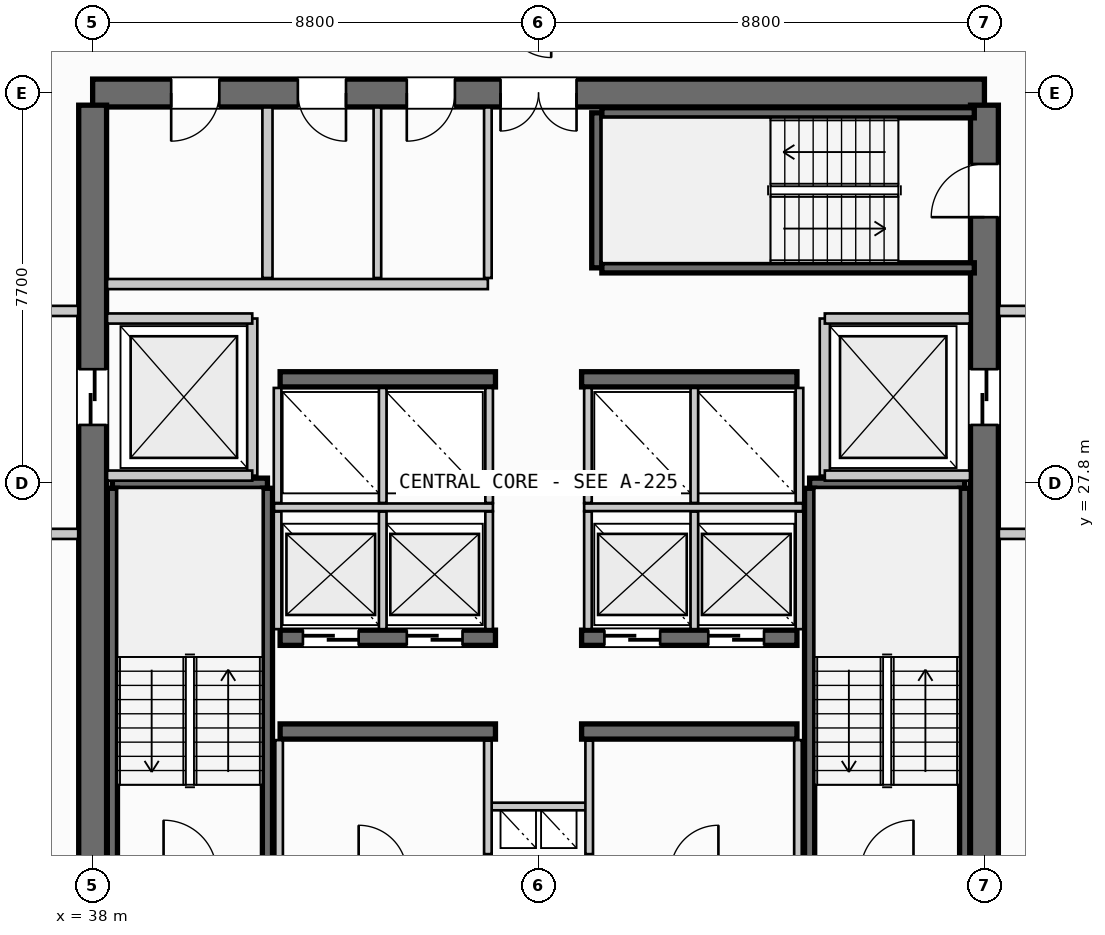
"""IFC4 building model, lengths in metres.
Left out: names, types, materials, properties, quantities, classifications, styles, units other than length and angle.
Written with IfcOpenShell. Run it as: python <this file> out.ifc"""

import sys

from ifc_helpers import new_model, si_unit, direction, frame, frame_2d, origin, place, context, subcontext, project, spatial, rectangle, extrude, source, transform, mapped, element, fill, save


model = new_model("IFC4")
c1 = context("Model", 3, precision=1e-05, world=origin(), true_north=direction((0.0, 1.0)))
c2 = subcontext(c1, "Body", "Model", "MODEL_VIEW")
j1 = project(units=[si_unit("LENGTHUNIT", "METRE"), si_unit("PLANEANGLEUNIT", "RADIAN")], contexts=[c1])
p1 = place(None, origin())
s1 = spatial("IfcSite", under=j1, at=p1, CompositionType="ELEMENT")
p2 = place(p1, origin())
s2 = spatial("IfcBuilding", under=s1, at=p2, CompositionType="ELEMENT")
p3 = place(p2, frame((0.0, 0.0, 183.4)))
s3 = spatial("IfcBuildingStorey", under=s2, at=p3, CompositionType="ELEMENT", Elevation=183.4)
p4 = place(p3, frame((55.6, 35.5, 0.0), z_axis=(0.0, 0.0, 1.0), x_axis=(-1.0, 0.0, 0.0)))
e1 = element("IfcWall", 1, at=p4, inside=s3, PredefinedType="SHEAR", context=c2, shape_type="SweptSolid", body=[
    extrude(rectangle(XDim=17.6, YDim=0.55, at=frame_2d((8.8, 0.0))), origin(), (0.0, 0.0, 1.0), 3.26),
])
p5 = place(p4, frame((8.05, 0.0, 0.0)))
e2 = element("IfcOpeningElement", 2, at=p5, cuts=e1, PredefinedType="OPENING", context=c2, shape_type="SweptSolid", body=[
    extrude(rectangle(XDim=1.5, YDim=2.2, at=frame_2d((0.75, 1.1))), frame((0.0, 0.285, 0.0), z_axis=(0.0, -1.0, 0.0), x_axis=(1.0, 0.0, 0.0)), (0.0, 0.0, 1.0), 0.57),
])
p6 = place(p4, frame((15.1, 0.0, 0.0)))
e3 = element("IfcOpeningElement", 3, at=p6, cuts=e1, PredefinedType="OPENING", context=c2, shape_type="SweptSolid", body=[
    extrude(rectangle(XDim=0.95, YDim=2.15, at=frame_2d((0.475, 1.075))), frame((0.0, 0.285, 0.0), z_axis=(0.0, -1.0, 0.0), x_axis=(1.0, 0.0, 0.0)), (0.0, 0.0, 1.0), 0.57),
])
p7 = place(p4, frame((12.6, 0.0, 0.0)))
e4 = element("IfcOpeningElement", 4, at=p7, cuts=e1, PredefinedType="OPENING", context=c2, shape_type="SweptSolid", body=[
    extrude(rectangle(XDim=0.95, YDim=2.15, at=frame_2d((0.475, 1.075))), frame((0.0, 0.285, 0.0), z_axis=(0.0, -1.0, 0.0), x_axis=(1.0, 0.0, 0.0)), (0.0, 0.0, 1.0), 0.57),
])
p8 = place(p4, frame((10.45, 0.0, 0.0)))
e5 = element("IfcOpeningElement", 5, at=p8, cuts=e1, PredefinedType="OPENING", context=c2, shape_type="SweptSolid", body=[
    extrude(rectangle(XDim=0.95, YDim=2.15, at=frame_2d((0.475, 1.075))), frame((0.0, 0.285, 0.0), z_axis=(0.0, -1.0, 0.0), x_axis=(1.0, 0.0, 0.0)), (0.0, 0.0, 1.0), 0.57),
])
p9 = place(p3, frame((38.0, 35.26, 0.0), z_axis=(0.0, 0.0, 1.0), x_axis=(0.0, -1.0, 0.0)))
e6 = element("IfcWall", 6, at=p9, inside=s3, PredefinedType="SHEAR", context=c2, shape_type="SweptSolid", body=[
    extrude(rectangle(XDim=14.92, YDim=0.55, at=frame_2d((7.46, 0.0))), origin(), (0.0, 0.0, 1.0), 3.26),
])
p10 = place(p9, frame((5.21, 0.0, 0.0)))
e7 = element("IfcOpeningElement", 7, at=p10, cuts=e6, PredefinedType="OPENING", context=c2, shape_type="SweptSolid", body=[
    extrude(rectangle(XDim=1.1, YDim=2.2, at=frame_2d((0.55, 1.1))), frame((0.0, 0.285, 0.0), z_axis=(0.0, -1.0, 0.0), x_axis=(1.0, 0.0, 0.0)), (0.0, 0.0, 1.0), 0.57),
])
p11 = place(p3, frame((55.6, 20.34, 0.0), z_axis=(0.0, 0.0, 1.0), x_axis=(0.0, 1.0, 0.0)))
e8 = element("IfcWall", 8, at=p11, inside=s3, PredefinedType="SHEAR", context=c2, shape_type="SweptSolid", body=[
    extrude(rectangle(XDim=14.92, YDim=0.55, at=frame_2d((7.46, 0.0))), origin(), (0.0, 0.0, 1.0), 3.26),
])
p12 = place(p11, frame((12.71, 0.0, 0.0)))
e9 = element("IfcOpeningElement", 9, at=p12, cuts=e8, PredefinedType="OPENING", context=c2, shape_type="SweptSolid", body=[
    extrude(rectangle(XDim=1.05, YDim=2.15, at=frame_2d((0.525, 1.075))), frame((0.0, 0.285, 0.0), z_axis=(0.0, -1.0, 0.0), x_axis=(1.0, 0.0, 0.0)), (0.0, 0.0, 1.0), 0.57),
])
p13 = place(p11, frame((8.61, 0.0, 0.0)))
e10 = element("IfcOpeningElement", 10, at=p13, cuts=e8, PredefinedType="OPENING", context=c2, shape_type="SweptSolid", body=[
    extrude(rectangle(XDim=1.1, YDim=2.2, at=frame_2d((0.55, 1.1))), frame((0.0, 0.285, 0.0), z_axis=(0.0, -1.0, 0.0), x_axis=(1.0, 0.0, 0.0)), (0.0, 0.0, 1.0), 0.57),
])
for number, where, z_axis, x_axis in (
    (11, (41.7, 22.9, 0.0), (0.0, 0.0, 1.0), (1.0, 0.0, 0.0)),
    (12, (47.65, 22.9, 0.0), (0.0, 0.0, 1.0), (1.0, 0.0, 0.0)),
):
    element("IfcWall", number, at=place(p3, frame(where, z_axis=z_axis, x_axis=x_axis)), inside=s3, PredefinedType="SHEAR", context=c2, shape_type="SweptSolid", body=[
        extrude(rectangle(XDim=4.25, YDim=0.3, at=frame_2d((2.125, 0.0))), origin(), (0.0, 0.0, 1.0), 3.26),
    ])
p14 = place(p3, frame((41.7, 24.75, 0.0), z_axis=(0.0, 0.0, 1.0), x_axis=(1.0, 0.0, 0.0)))
e13 = element("IfcWall", 13, at=p14, inside=s3, PredefinedType="SHEAR", context=c2, shape_type="SweptSolid", body=[
    extrude(rectangle(XDim=4.25, YDim=0.3, at=frame_2d((2.125, 0.0))), origin(), (0.0, 0.0, 1.0), 3.26),
])
p15 = place(p14, frame((0.45, 0.0, 0.0)))
e14 = element("IfcOpeningElement", 14, at=p15, cuts=e13, PredefinedType="OPENING", context=c2, shape_type="SweptSolid", body=[
    extrude(rectangle(XDim=1.1, YDim=2.2, at=frame_2d((0.55, 1.1))), frame((0.0, 0.16, 0.0), z_axis=(0.0, -1.0, 0.0), x_axis=(1.0, 0.0, 0.0)), (0.0, 0.0, 1.0), 0.32),
])
p16 = place(p14, frame((2.5, 0.0, 0.0)))
e15 = element("IfcOpeningElement", 15, at=p16, cuts=e13, PredefinedType="OPENING", context=c2, shape_type="SweptSolid", body=[
    extrude(rectangle(XDim=1.1, YDim=2.2, at=frame_2d((0.55, 1.1))), frame((0.0, 0.16, 0.0), z_axis=(0.0, -1.0, 0.0), x_axis=(1.0, 0.0, 0.0)), (0.0, 0.0, 1.0), 0.32),
])
p17 = place(p3, frame((47.65, 24.75, 0.0), z_axis=(0.0, 0.0, 1.0), x_axis=(1.0, 0.0, 0.0)))
e16 = element("IfcWall", 16, at=p17, inside=s3, PredefinedType="SHEAR", context=c2, shape_type="SweptSolid", body=[
    extrude(rectangle(XDim=4.25, YDim=0.3, at=frame_2d((2.125, 0.0))), origin(), (0.0, 0.0, 1.0), 3.26),
])
p18 = place(p17, frame((0.45, 0.0, 0.0)))
e17 = element("IfcOpeningElement", 17, at=p18, cuts=e16, PredefinedType="OPENING", context=c2, shape_type="SweptSolid", body=[
    extrude(rectangle(XDim=1.1, YDim=2.2, at=frame_2d((0.55, 1.1))), frame((0.0, 0.16, 0.0), z_axis=(0.0, -1.0, 0.0), x_axis=(1.0, 0.0, 0.0)), (0.0, 0.0, 1.0), 0.32),
])
p19 = place(p17, frame((2.5, 0.0, 0.0)))
e18 = element("IfcOpeningElement", 18, at=p19, cuts=e16, PredefinedType="OPENING", context=c2, shape_type="SweptSolid", body=[
    extrude(rectangle(XDim=1.1, YDim=2.2, at=frame_2d((0.55, 1.1))), frame((0.0, 0.16, 0.0), z_axis=(0.0, -1.0, 0.0), x_axis=(1.0, 0.0, 0.0)), (0.0, 0.0, 1.0), 0.32),
])
for number, where, z_axis, x_axis in (
    (19, (41.7, 29.85, 0.0), (0.0, 0.0, 1.0), (1.0, 0.0, 0.0)),
    (20, (47.65, 29.85, 0.0), (0.0, 0.0, 1.0), (1.0, 0.0, 0.0)),
):
    element("IfcWall", number, at=place(p3, frame(where, z_axis=z_axis, x_axis=x_axis)), inside=s3, PredefinedType="SHEAR", context=c2, shape_type="SweptSolid", body=[
        extrude(rectangle(XDim=4.25, YDim=0.3, at=frame_2d((2.125, 0.0))), origin(), (0.0, 0.0, 1.0), 3.26),
    ])
p20 = place(p3, frame((38.39, 27.8, 0.0), z_axis=(0.0, 0.0, 1.0), x_axis=(1.0, 0.0, 0.0)))
e21 = element("IfcWall", 21, at=p20, inside=s3, PredefinedType="SHEAR", context=c2, shape_type="SweptSolid", body=[
    extrude(rectangle(XDim=3.06, YDim=0.2, at=frame_2d((1.53, 0.0))), origin(), (0.0, 0.0, 1.0), 3.26),
])
for number, where, z_axis, x_axis in (
    (22, (41.45, 27.7, 0.0), (0.0, 0.0, 1.0), (0.0, -1.0, 0.0)),
    (23, (38.39, 20.35, 0.0), (0.0, 0.0, 1.0), (0.0, 1.0, 0.0)),
):
    element("IfcWall", number, at=place(p3, frame(where, z_axis=z_axis, x_axis=x_axis)), inside=s3, PredefinedType="SHEAR", context=c2, shape_type="SweptSolid", body=[
        extrude(rectangle(XDim=7.35, YDim=0.2, at=frame_2d((3.675, 0.0))), origin(), (0.0, 0.0, 1.0), 3.26),
    ])
p21 = place(p3, frame((52.15, 27.8, 0.0), z_axis=(0.0, 0.0, 1.0), x_axis=(1.0, 0.0, 0.0)))
e24 = element("IfcWall", 24, at=p21, inside=s3, PredefinedType="SHEAR", context=c2, shape_type="SweptSolid", body=[
    extrude(rectangle(XDim=3.06, YDim=0.2, at=frame_2d((1.53, 0.0))), origin(), (0.0, 0.0, 1.0), 3.26),
])
for number, where, z_axis, x_axis in (
    (25, (55.21, 27.7, 0.0), (0.0, 0.0, 1.0), (0.0, -1.0, 0.0)),
    (26, (52.15, 20.35, 0.0), (0.0, 0.0, 1.0), (0.0, 1.0, 0.0)),
):
    element("IfcWall", number, at=place(p3, frame(where, z_axis=z_axis, x_axis=x_axis)), inside=s3, PredefinedType="SHEAR", context=c2, shape_type="SweptSolid", body=[
        extrude(rectangle(XDim=7.35, YDim=0.2, at=frame_2d((3.675, 0.0))), origin(), (0.0, 0.0, 1.0), 3.26),
    ])
p22 = place(p3, frame((47.95, 32.05, 0.0), z_axis=(0.0, 0.0, 1.0), x_axis=(0.0, 1.0, 0.0)))
e27 = element("IfcWall", 27, at=p22, inside=s3, PredefinedType="SHEAR", context=c2, shape_type="SweptSolid", body=[
    extrude(rectangle(XDim=3.06, YDim=0.2, at=frame_2d((1.53, 0.0))), origin(), (0.0, 0.0, 1.0), 3.26),
])
for number, where, z_axis, x_axis in (
    (28, (48.05, 35.11, 0.0), (0.0, 0.0, 1.0), (1.0, 0.0, 0.0)),
    (29, (55.4, 32.05, 0.0), (0.0, 0.0, 1.0), (-1.0, 0.0, 0.0)),
):
    element("IfcWall", number, at=place(p3, frame(where, z_axis=z_axis, x_axis=x_axis)), inside=s3, PredefinedType="SHEAR", context=c2, shape_type="SweptSolid", body=[
        extrude(rectangle(XDim=7.35, YDim=0.2, at=frame_2d((3.675, 0.0))), origin(), (0.0, 0.0, 1.0), 3.26),
    ])
p23 = place(p3, frame((45.8, 21.42, 0.0), z_axis=(0.0, 0.0, 1.0), x_axis=(1.0, 0.0, 0.0)))
e30 = element("IfcWall", 30, at=p23, inside=s3, PredefinedType="PARTITIONING", context=c2, shape_type="SweptSolid", body=[
    extrude(rectangle(XDim=2.0, YDim=0.15, at=frame_2d((1.0, 0.0))), origin(), (0.0, 0.0, 1.0), 2.28),
])
for number, where, z_axis, x_axis in (
    (31, (45.8, 20.48, 0.0), (0.0, 0.0, 1.0), (0.0, 1.0, 0.0)),
    (32, (47.8, 20.48, 0.0), (0.0, 0.0, 1.0), (0.0, 1.0, 0.0)),
):
    element("IfcWall", number, at=place(p3, frame(where, z_axis=z_axis, x_axis=x_axis)), inside=s3, PredefinedType="PARTITIONING", context=c2, shape_type="SweptSolid", body=[
        extrude(rectangle(XDim=2.24, YDim=0.15, at=frame_2d((1.12, 0.0))), origin(), (0.0, 0.0, 1.0), 2.28),
    ])
p24 = place(p3, frame((41.15, 27.95, 0.0), z_axis=(0.0, 0.0, 1.0), x_axis=(0.0, 1.0, 0.0)))
e33 = element("IfcWall", 33, at=p24, inside=s3, PredefinedType="PARTITIONING", context=c2, shape_type="SweptSolid", body=[
    extrude(rectangle(XDim=3.1, YDim=0.2, at=frame_2d((1.55, 0.0))), origin(), (0.0, 0.0, 1.0), 2.28),
])
for number, where, z_axis, x_axis in (
    (34, (38.285, 27.95, 0.0), (0.0, 0.0, 1.0), (1.0, 0.0, 0.0)),
    (35, (38.285, 31.05, 0.0), (0.0, 0.0, 1.0), (1.0, 0.0, 0.0)),
):
    element("IfcWall", number, at=place(p3, frame(where, z_axis=z_axis, x_axis=x_axis)), inside=s3, PredefinedType="PARTITIONING", context=c2, shape_type="SweptSolid", body=[
        extrude(rectangle(XDim=2.865, YDim=0.2, at=frame_2d((1.433, 0.0))), origin(), (0.0, 0.0, 1.0), 2.28),
    ])
for number, where, z_axis, x_axis in (
    (36, (34.5, 26.8, 0.0), (0.0, 0.0, 1.0), (1.0, 0.0, 0.0)),
    (37, (34.5, 31.2, 0.0), (0.0, 0.0, 1.0), (1.0, 0.0, 0.0)),
):
    element("IfcWall", number, at=place(p3, frame(where, z_axis=z_axis, x_axis=x_axis)), inside=s3, PredefinedType="PARTITIONING", context=c2, shape_type="SweptSolid", body=[
        extrude(rectangle(XDim=3.215, YDim=0.2, at=frame_2d((1.607, 0.0))), origin(), (0.0, 0.0, 1.0), 2.28),
    ])
p25 = place(p3, frame((52.45, 27.95, 0.0), z_axis=(0.0, 0.0, 1.0), x_axis=(0.0, 1.0, 0.0)))
e38 = element("IfcWall", 38, at=p25, inside=s3, PredefinedType="PARTITIONING", context=c2, shape_type="SweptSolid", body=[
    extrude(rectangle(XDim=3.1, YDim=0.2, at=frame_2d((1.55, 0.0))), origin(), (0.0, 0.0, 1.0), 2.28),
])
for number, where, z_axis, x_axis in (
    (39, (52.45, 27.95, 0.0), (0.0, 0.0, 1.0), (1.0, 0.0, 0.0)),
    (40, (52.45, 31.05, 0.0), (0.0, 0.0, 1.0), (1.0, 0.0, 0.0)),
):
    element("IfcWall", number, at=place(p3, frame(where, z_axis=z_axis, x_axis=x_axis)), inside=s3, PredefinedType="PARTITIONING", context=c2, shape_type="SweptSolid", body=[
        extrude(rectangle(XDim=2.865, YDim=0.2, at=frame_2d((1.433, 0.0))), origin(), (0.0, 0.0, 1.0), 2.28),
    ])
for number, where, z_axis, x_axis in (
    (41, (55.885, 26.8, 0.0), (0.0, 0.0, 1.0), (1.0, 0.0, 0.0)),
    (42, (55.885, 31.2, 0.0), (0.0, 0.0, 1.0), (1.0, 0.0, 0.0)),
):
    element("IfcWall", number, at=place(p3, frame(where, z_axis=z_axis, x_axis=x_axis)), inside=s3, PredefinedType="PARTITIONING", context=c2, shape_type="SweptSolid", body=[
        extrude(rectangle(XDim=3.215, YDim=0.2, at=frame_2d((1.607, 0.0))), origin(), (0.0, 0.0, 1.0), 2.28),
    ])
for number, where, z_axis, x_axis in (
    (43, (41.68, 20.385, 0.0), (0.0, 0.0, 1.0), (0.0, 1.0, 0.0)),
    (44, (51.92, 20.385, 0.0), (0.0, 0.0, 1.0), (0.0, 1.0, 0.0)),
):
    element("IfcWall", number, at=place(p3, frame(where, z_axis=z_axis, x_axis=x_axis)), inside=s3, PredefinedType="PARTITIONING", context=c2, shape_type="SweptSolid", body=[
        extrude(rectangle(XDim=2.345, YDim=0.15, at=frame_2d((1.172, 0.0))), origin(), (0.0, 0.0, 1.0), 2.28),
    ])
p26 = place(p3, frame((41.58, 27.325, 0.0), z_axis=(0.0, 0.0, 1.0), x_axis=(1.0, 0.0, 0.0)))
e45 = element("IfcWall", 45, at=p26, inside=s3, PredefinedType="PARTITIONING", context=c2, shape_type="SweptSolid", body=[
    extrude(rectangle(XDim=4.32, YDim=0.15, at=frame_2d((2.16, 0.0))), origin(), (0.0, 0.0, 1.0), 2.28),
])
p27 = place(p3, frame((47.7, 27.325, 0.0), z_axis=(0.0, 0.0, 1.0), x_axis=(1.0, 0.0, 0.0)))
e46 = element("IfcWall", 46, at=p27, inside=s3, PredefinedType="PARTITIONING", context=c2, shape_type="SweptSolid", body=[
    extrude(rectangle(XDim=4.32, YDim=0.15, at=frame_2d((2.16, 0.0))), origin(), (0.0, 0.0, 1.0), 2.28),
])
for number, where, z_axis, x_axis in (
    (47, (41.65, 24.92, 0.0), (0.0, 0.0, 1.0), (0.0, 1.0, 0.0)),
    (48, (43.725, 24.92, 0.0), (0.0, 0.0, 1.0), (0.0, 1.0, 0.0)),
    (49, (45.825, 24.92, 0.0), (0.0, 0.0, 1.0), (0.0, 1.0, 0.0)),
    (50, (47.775, 24.92, 0.0), (0.0, 0.0, 1.0), (0.0, 1.0, 0.0)),
    (51, (49.875, 24.92, 0.0), (0.0, 0.0, 1.0), (0.0, 1.0, 0.0)),
    (52, (51.95, 24.92, 0.0), (0.0, 0.0, 1.0), (0.0, 1.0, 0.0)),
):
    element("IfcWall", number, at=place(p3, frame(where, z_axis=z_axis, x_axis=x_axis)), inside=s3, PredefinedType="PARTITIONING", context=c2, shape_type="SweptSolid", body=[
        extrude(rectangle(XDim=2.32, YDim=0.15, at=frame_2d((1.16, 0.0))), origin(), (0.0, 0.0, 1.0), 2.28),
    ])
for number, where, z_axis, x_axis in (
    (53, (41.65, 27.41, 0.0), (0.0, 0.0, 1.0), (0.0, 1.0, 0.0)),
    (54, (43.725, 27.41, 0.0), (0.0, 0.0, 1.0), (0.0, 1.0, 0.0)),
    (55, (45.825, 27.41, 0.0), (0.0, 0.0, 1.0), (0.0, 1.0, 0.0)),
    (56, (47.775, 27.41, 0.0), (0.0, 0.0, 1.0), (0.0, 1.0, 0.0)),
    (57, (49.875, 27.41, 0.0), (0.0, 0.0, 1.0), (0.0, 1.0, 0.0)),
    (58, (51.95, 27.41, 0.0), (0.0, 0.0, 1.0), (0.0, 1.0, 0.0)),
):
    element("IfcWall", number, at=place(p3, frame(where, z_axis=z_axis, x_axis=x_axis)), inside=s3, PredefinedType="PARTITIONING", context=c2, shape_type="SweptSolid", body=[
        extrude(rectangle(XDim=2.27, YDim=0.15, at=frame_2d((1.135, 0.0))), origin(), (0.0, 0.0, 1.0), 2.28),
    ])
p28 = place(p3, frame((41.45, 31.85, 0.0), z_axis=(0.0, 0.0, 1.0), x_axis=(0.0, 1.0, 0.0)))
e59 = element("IfcWall", 59, at=p28, inside=s3, PredefinedType="PARTITIONING", context=c2, shape_type="SweptSolid", body=[
    extrude(rectangle(XDim=3.365, YDim=0.2, at=frame_2d((1.683, 0.0))), origin(), (0.0, 0.0, 1.0), 2.28),
])
p29 = place(p3, frame((38.285, 31.73, 0.0), z_axis=(0.0, 0.0, 1.0), x_axis=(1.0, 0.0, 0.0)))
e60 = element("IfcWall", 60, at=p29, inside=s3, PredefinedType="PARTITIONING", context=c2, shape_type="SweptSolid", body=[
    extrude(rectangle(XDim=7.515, YDim=0.2, at=frame_2d((3.758, 0.0))), origin(), (0.0, 0.0, 1.0), 2.28),
])
p30 = place(p3, frame((45.8, 31.85, 0.0), z_axis=(0.0, 0.0, 1.0), x_axis=(0.0, 1.0, 0.0)))
e61 = element("IfcWall", 61, at=p30, inside=s3, PredefinedType="PARTITIONING", context=c2, shape_type="SweptSolid", body=[
    extrude(rectangle(XDim=3.365, YDim=0.15, at=frame_2d((1.683, 0.0))), origin(), (0.0, 0.0, 1.0), 2.28),
])
p31 = place(p3, frame((43.62, 31.85, 0.0), z_axis=(0.0, 0.0, 1.0), x_axis=(0.0, 1.0, 0.0)))
e62 = element("IfcWall", 62, at=p31, inside=s3, PredefinedType="PLUMBINGWALL", context=c2, shape_type="SweptSolid", body=[
    extrude(rectangle(XDim=3.365, YDim=0.15, at=frame_2d((1.683, 0.0))), origin(), (0.0, 0.0, 1.0), 2.28),
])
m1 = source(origin(), c2, "Body", "SweptSolid", [
    extrude(rectangle(XDim=1.05, YDim=2.15, at=frame_2d((0.525, 1.075))), frame((0.0, 0.025, 0.0), z_axis=(0.0, -1.0, 0.0), x_axis=(1.0, 0.0, 0.0)), (0.0, 0.0, 1.0), 0.05),
])
p32 = place(p12, origin())
e63 = element("IfcDoor", 63, at=p32, inside=s3, OperationType="SINGLE_SWING_LEFT", PredefinedType="DOOR", context=c2, shape_type="MappedRepresentation", body=[
    mapped(m1, transform((0.0, 0.0, 0.0), scale=1.0)),
])
fill(e9, e63)
m2 = source(origin(), c2, "Body", "SweptSolid", [
    extrude(rectangle(XDim=1.5, YDim=2.2, at=frame_2d((0.75, 1.1))), frame((0.0, 0.025, 0.0), z_axis=(0.0, -1.0, 0.0), x_axis=(1.0, 0.0, 0.0)), (0.0, 0.0, 1.0), 0.05),
])
p33 = place(p5, origin())
e64 = element("IfcDoor", 64, at=p33, inside=s3, OperationType="DOUBLE_DOOR_SINGLE_SWING", PredefinedType="DOOR", context=c2, shape_type="MappedRepresentation", body=[
    mapped(m2, transform((0.0, 0.0, 0.0), scale=1.0)),
])
fill(e2, e64)
m3 = source(origin(), c2, "Body", "SweptSolid", [
    extrude(rectangle(XDim=1.1, YDim=2.2, at=frame_2d((0.55, 1.1))), frame((0.0, 0.025, 0.0), z_axis=(0.0, -1.0, 0.0), x_axis=(1.0, 0.0, 0.0)), (0.0, 0.0, 1.0), 0.05),
])
p34 = place(p10, origin())
e65 = element("IfcDoor", 65, at=p34, inside=s3, OperationType="SLIDING_TO_LEFT", PredefinedType="DOOR", context=c2, shape_type="MappedRepresentation", body=[
    mapped(m3, transform((0.0, 0.0, 0.0), scale=1.0)),
])
fill(e7, e65)
p35 = place(p13, origin())
e66 = element("IfcDoor", 66, at=p35, inside=s3, OperationType="SLIDING_TO_RIGHT", PredefinedType="DOOR", context=c2, shape_type="MappedRepresentation", body=[
    mapped(m3, transform((0.0, 0.0, 0.0), scale=1.0)),
])
fill(e10, e66)
p36 = place(p15, origin())
e67 = element("IfcDoor", 67, at=p36, inside=s3, OperationType="SLIDING_TO_RIGHT", PredefinedType="DOOR", context=c2, shape_type="MappedRepresentation", body=[
    mapped(m3, transform((0.0, 0.0, 0.0), scale=1.0)),
])
fill(e14, e67)
p37 = place(p16, origin())
e68 = element("IfcDoor", 68, at=p37, inside=s3, OperationType="SLIDING_TO_RIGHT", PredefinedType="DOOR", context=c2, shape_type="MappedRepresentation", body=[
    mapped(m3, transform((0.0, 0.0, 0.0), scale=1.0)),
])
fill(e15, e68)
p38 = place(p18, origin())
e69 = element("IfcDoor", 69, at=p38, inside=s3, OperationType="SLIDING_TO_RIGHT", PredefinedType="DOOR", context=c2, shape_type="MappedRepresentation", body=[
    mapped(m3, transform((0.0, 0.0, 0.0), scale=1.0)),
])
fill(e17, e69)
p39 = place(p19, origin())
e70 = element("IfcDoor", 70, at=p39, inside=s3, OperationType="SLIDING_TO_RIGHT", PredefinedType="DOOR", context=c2, shape_type="MappedRepresentation", body=[
    mapped(m3, transform((0.0, 0.0, 0.0), scale=1.0)),
])
fill(e18, e70)
m4 = source(origin(), c2, "Body", "SweptSolid", [
    extrude(rectangle(XDim=0.95, YDim=2.15, at=frame_2d((0.475, 1.075))), frame((0.0, 0.025, 0.0), z_axis=(0.0, -1.0, 0.0), x_axis=(1.0, 0.0, 0.0)), (0.0, 0.0, 1.0), 0.05),
])
p40 = place(p6, origin())
e71 = element("IfcDoor", 71, at=p40, inside=s3, OperationType="SINGLE_SWING_RIGHT", PredefinedType="DOOR", context=c2, shape_type="MappedRepresentation", body=[
    mapped(m4, transform((0.0, 0.0, 0.0), scale=1.0)),
])
fill(e3, e71)
p41 = place(p7, origin())
e72 = element("IfcDoor", 72, at=p41, inside=s3, OperationType="SINGLE_SWING_LEFT", PredefinedType="DOOR", context=c2, shape_type="MappedRepresentation", body=[
    mapped(m4, transform((0.0, 0.0, 0.0), scale=1.0)),
])
fill(e4, e72)
p42 = place(p8, origin())
e73 = element("IfcDoor", 73, at=p42, inside=s3, OperationType="SINGLE_SWING_RIGHT", PredefinedType="DOOR", context=c2, shape_type="MappedRepresentation", body=[
    mapped(m4, transform((0.0, 0.0, 0.0), scale=1.0)),
])
fill(e5, e73)
save(model, sys.argv[1])
